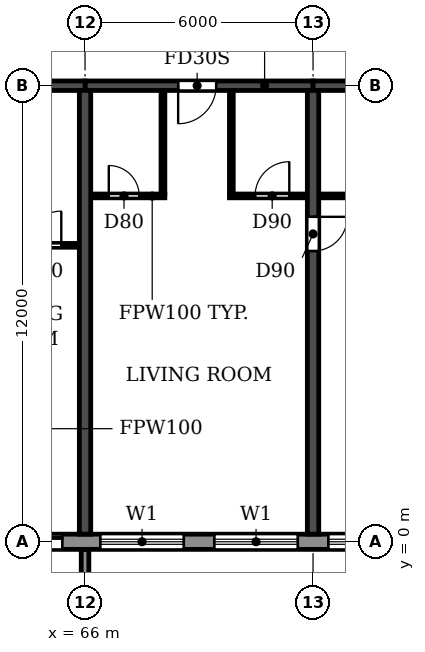
"""IFC4 building model, lengths in metres.
Left out: names, types, materials, properties, quantities, classifications, styles, units other than length and angle.
Written with IfcOpenShell. Run it as: python <this file> out.ifc"""

import sys

from ifc_helpers import new_model, si_unit, direction, frame, frame_2d, origin, place, context, subcontext, project, spatial, polyline, rectangle, outline, extrude, source, transform, mapped, element, fill, save


model = new_model("IFC4")
c1 = context("Model", 3, precision=1e-05, world=origin(), true_north=direction((0.0, 1.0)))
c2 = subcontext(c1, "Body", "Model", "MODEL_VIEW")
j1 = project(units=[si_unit("LENGTHUNIT", "METRE"), si_unit("PLANEANGLEUNIT", "RADIAN")], contexts=[c1])
p1 = place(None, origin())
s1 = spatial("IfcSite", under=j1, at=p1, CompositionType="ELEMENT")
p2 = place(p1, origin())
s2 = spatial("IfcBuilding", under=s1, at=p2, CompositionType="ELEMENT")
p3 = place(p2, frame((0.0, 0.0, 142.2)))
s3 = spatial("IfcBuildingStorey", under=s2, at=p3, CompositionType="ELEMENT", Elevation=142.2)
p4 = place(p3, frame((66.0, 0.2, 0.0), z_axis=(0.0, 0.0, 1.0), x_axis=(0.0, 1.0, 0.0)))
e1 = element("IfcWall", 1, at=p4, inside=s3, PredefinedType="SHEAR", context=c2, shape_type="SweptSolid", body=[
    extrude(rectangle(XDim=11.675, YDim=0.3, at=frame_2d((5.837, 0.0))), origin(), (0.0, 0.0, 1.0), 3.07),
])
p5 = place(p3, frame((72.0, 0.2, 0.0), z_axis=(0.0, 0.0, 1.0), x_axis=(0.0, 1.0, 0.0)))
e2 = element("IfcWall", 2, at=p5, inside=s3, PredefinedType="SHEAR", context=c2, shape_type="SweptSolid", body=[
    extrude(rectangle(XDim=11.675, YDim=0.3, at=frame_2d((5.837, 0.0))), origin(), (0.0, 0.0, 1.0), 3.07),
])
p6 = place(p5, frame((7.45, 0.0, 0.0)))
e3 = element("IfcOpeningElement", 3, at=p6, cuts=e2, PredefinedType="OPENING", context=c2, shape_type="SweptSolid", body=[
    extrude(rectangle(XDim=0.9, YDim=2.1, at=frame_2d((0.45, 1.05))), frame((0.0, 0.16, 0.0), z_axis=(0.0, -1.0, 0.0), x_axis=(1.0, 0.0, 0.0)), (0.0, 0.0, 1.0), 0.32),
])
p7 = place(p3, frame((60.0, 12.0, 0.0), z_axis=(0.0, 0.0, 1.0), x_axis=(1.0, 0.0, 0.0)))
e4 = element("IfcWall", 4, at=p7, inside=s3, PredefinedType="SHEAR", context=c2, shape_type="SweptSolid", body=[
    extrude(rectangle(XDim=6.0, YDim=0.25, at=frame_2d((3.0, 0.0))), origin(), (0.0, 0.0, 1.0), 2.47),
])
p8 = place(p7, frame((2.45, 0.0, 0.0)))
e5 = element("IfcOpeningElement", 5, at=p8, cuts=e4, PredefinedType="OPENING", context=c2, shape_type="SweptSolid", body=[
    extrude(rectangle(XDim=1.0, YDim=2.1, at=frame_2d((0.5, 1.05))), frame((0.0, 0.135, 0.0), z_axis=(0.0, -1.0, 0.0), x_axis=(1.0, 0.0, 0.0)), (0.0, 0.0, 1.0), 0.27),
])
p9 = place(p3, frame((66.0, 12.0, 0.0), z_axis=(0.0, 0.0, 1.0), x_axis=(1.0, 0.0, 0.0)))
e6 = element("IfcWall", 6, at=p9, inside=s3, PredefinedType="SHEAR", context=c2, shape_type="SweptSolid", body=[
    extrude(rectangle(XDim=6.0, YDim=0.25, at=frame_2d((3.0, 0.0))), origin(), (0.0, 0.0, 1.0), 2.47),
])
p10 = place(p9, frame((2.45, 0.0, 0.0)))
e7 = element("IfcOpeningElement", 7, at=p10, cuts=e6, PredefinedType="OPENING", context=c2, shape_type="SweptSolid", body=[
    extrude(rectangle(XDim=1.0, YDim=2.1, at=frame_2d((0.5, 1.05))), frame((0.0, 0.135, 0.0), z_axis=(0.0, -1.0, 0.0), x_axis=(1.0, 0.0, 0.0)), (0.0, 0.0, 1.0), 0.27),
])
p11 = place(p3, frame((72.0, 12.0, 0.0), z_axis=(0.0, 0.0, 1.0), x_axis=(1.0, 0.0, 0.0)))
e8 = element("IfcWall", 8, at=p11, inside=s3, PredefinedType="SHEAR", context=c2, shape_type="SweptSolid", body=[
    extrude(rectangle(XDim=6.0, YDim=0.25, at=frame_2d((3.0, 0.0))), origin(), (0.0, 0.0, 1.0), 2.47),
])
p12 = place(p3, frame((16.683, 0.0, 0.0), z_axis=(0.0, 0.0, 1.0), x_axis=(1.0, 0.0, 0.0)))
e9 = element("IfcWall", 9, at=p12, inside=s3, PredefinedType="STANDARD", context=c2, shape_type="SweptSolid", body=[
    extrude(rectangle(XDim=68.634, YDim=0.4, at=frame_2d((34.317, 0.0))), origin(), (0.0, 0.0, 1.0), 3.07),
])
p13 = place(p12, frame((1.717, 0.0, 0.9)))
e10 = element("IfcOpeningElement", 10, at=p13, cuts=e9, PredefinedType="OPENING", context=c2, shape_type="SweptSolid", body=[
    extrude(rectangle(XDim=2.2, YDim=1.5, at=frame_2d((1.1, 0.75))), frame((0.0, 0.21, 0.0), z_axis=(0.0, -1.0, 0.0), x_axis=(1.0, 0.0, 0.0)), (0.0, 0.0, 1.0), 0.42),
])
p14 = place(p12, frame((4.717, 0.0, 0.9)))
e11 = element("IfcOpeningElement", 11, at=p14, cuts=e9, PredefinedType="OPENING", context=c2, shape_type="SweptSolid", body=[
    extrude(rectangle(XDim=2.2, YDim=1.5, at=frame_2d((1.1, 0.75))), frame((0.0, 0.21, 0.0), z_axis=(0.0, -1.0, 0.0), x_axis=(1.0, 0.0, 0.0)), (0.0, 0.0, 1.0), 0.42),
])
p15 = place(p12, frame((7.717, 0.0, 0.9)))
e12 = element("IfcOpeningElement", 12, at=p15, cuts=e9, PredefinedType="OPENING", context=c2, shape_type="SweptSolid", body=[
    extrude(rectangle(XDim=2.2, YDim=1.5, at=frame_2d((1.1, 0.75))), frame((0.0, 0.21, 0.0), z_axis=(0.0, -1.0, 0.0), x_axis=(1.0, 0.0, 0.0)), (0.0, 0.0, 1.0), 0.42),
])
p16 = place(p12, frame((10.717, 0.0, 0.9)))
e13 = element("IfcOpeningElement", 13, at=p16, cuts=e9, PredefinedType="OPENING", context=c2, shape_type="SweptSolid", body=[
    extrude(rectangle(XDim=2.2, YDim=1.5, at=frame_2d((1.1, 0.75))), frame((0.0, 0.21, 0.0), z_axis=(0.0, -1.0, 0.0), x_axis=(1.0, 0.0, 0.0)), (0.0, 0.0, 1.0), 0.42),
])
p17 = place(p12, frame((13.717, 0.0, 0.9)))
e14 = element("IfcOpeningElement", 14, at=p17, cuts=e9, PredefinedType="OPENING", context=c2, shape_type="SweptSolid", body=[
    extrude(rectangle(XDim=2.2, YDim=1.5, at=frame_2d((1.1, 0.75))), frame((0.0, 0.21, 0.0), z_axis=(0.0, -1.0, 0.0), x_axis=(1.0, 0.0, 0.0)), (0.0, 0.0, 1.0), 0.42),
])
p18 = place(p12, frame((16.717, 0.0, 0.9)))
e15 = element("IfcOpeningElement", 15, at=p18, cuts=e9, PredefinedType="OPENING", context=c2, shape_type="SweptSolid", body=[
    extrude(rectangle(XDim=2.2, YDim=1.5, at=frame_2d((1.1, 0.75))), frame((0.0, 0.21, 0.0), z_axis=(0.0, -1.0, 0.0), x_axis=(1.0, 0.0, 0.0)), (0.0, 0.0, 1.0), 0.42),
])
p19 = place(p12, frame((19.717, 0.0, 0.9)))
e16 = element("IfcOpeningElement", 16, at=p19, cuts=e9, PredefinedType="OPENING", context=c2, shape_type="SweptSolid", body=[
    extrude(rectangle(XDim=2.2, YDim=1.5, at=frame_2d((1.1, 0.75))), frame((0.0, 0.21, 0.0), z_axis=(0.0, -1.0, 0.0), x_axis=(1.0, 0.0, 0.0)), (0.0, 0.0, 1.0), 0.42),
])
p20 = place(p12, frame((22.717, 0.0, 0.9)))
e17 = element("IfcOpeningElement", 17, at=p20, cuts=e9, PredefinedType="OPENING", context=c2, shape_type="SweptSolid", body=[
    extrude(rectangle(XDim=2.2, YDim=1.5, at=frame_2d((1.1, 0.75))), frame((0.0, 0.21, 0.0), z_axis=(0.0, -1.0, 0.0), x_axis=(1.0, 0.0, 0.0)), (0.0, 0.0, 1.0), 0.42),
])
p21 = place(p12, frame((25.717, 0.0, 0.9)))
e18 = element("IfcOpeningElement", 18, at=p21, cuts=e9, PredefinedType="OPENING", context=c2, shape_type="SweptSolid", body=[
    extrude(rectangle(XDim=2.2, YDim=1.5, at=frame_2d((1.1, 0.75))), frame((0.0, 0.21, 0.0), z_axis=(0.0, -1.0, 0.0), x_axis=(1.0, 0.0, 0.0)), (0.0, 0.0, 1.0), 0.42),
])
p22 = place(p12, frame((28.717, 0.0, 0.9)))
e19 = element("IfcOpeningElement", 19, at=p22, cuts=e9, PredefinedType="OPENING", context=c2, shape_type="SweptSolid", body=[
    extrude(rectangle(XDim=2.2, YDim=1.5, at=frame_2d((1.1, 0.75))), frame((0.0, 0.21, 0.0), z_axis=(0.0, -1.0, 0.0), x_axis=(1.0, 0.0, 0.0)), (0.0, 0.0, 1.0), 0.42),
])
p23 = place(p12, frame((31.717, 0.0, 0.9)))
e20 = element("IfcOpeningElement", 20, at=p23, cuts=e9, PredefinedType="OPENING", context=c2, shape_type="SweptSolid", body=[
    extrude(rectangle(XDim=2.2, YDim=1.5, at=frame_2d((1.1, 0.75))), frame((0.0, 0.21, 0.0), z_axis=(0.0, -1.0, 0.0), x_axis=(1.0, 0.0, 0.0)), (0.0, 0.0, 1.0), 0.42),
])
p24 = place(p12, frame((34.917, 0.0, 0.0)))
e21 = element("IfcOpeningElement", 21, at=p24, cuts=e9, PredefinedType="OPENING", context=c2, shape_type="SweptSolid", body=[
    extrude(rectangle(XDim=1.8, YDim=2.4, at=frame_2d((0.9, 1.2))), frame((0.0, 0.21, 0.0), z_axis=(0.0, -1.0, 0.0), x_axis=(1.0, 0.0, 0.0)), (0.0, 0.0, 1.0), 0.42),
])
p25 = place(p12, frame((37.717, 0.0, 0.9)))
e22 = element("IfcOpeningElement", 22, at=p25, cuts=e9, PredefinedType="OPENING", context=c2, shape_type="SweptSolid", body=[
    extrude(rectangle(XDim=2.2, YDim=1.5, at=frame_2d((1.1, 0.75))), frame((0.0, 0.21, 0.0), z_axis=(0.0, -1.0, 0.0), x_axis=(1.0, 0.0, 0.0)), (0.0, 0.0, 1.0), 0.42),
])
p26 = place(p12, frame((40.717, 0.0, 0.9)))
e23 = element("IfcOpeningElement", 23, at=p26, cuts=e9, PredefinedType="OPENING", context=c2, shape_type="SweptSolid", body=[
    extrude(rectangle(XDim=2.2, YDim=1.5, at=frame_2d((1.1, 0.75))), frame((0.0, 0.21, 0.0), z_axis=(0.0, -1.0, 0.0), x_axis=(1.0, 0.0, 0.0)), (0.0, 0.0, 1.0), 0.42),
])
p27 = place(p12, frame((43.717, 0.0, 0.9)))
e24 = element("IfcOpeningElement", 24, at=p27, cuts=e9, PredefinedType="OPENING", context=c2, shape_type="SweptSolid", body=[
    extrude(rectangle(XDim=2.2, YDim=1.5, at=frame_2d((1.1, 0.75))), frame((0.0, 0.21, 0.0), z_axis=(0.0, -1.0, 0.0), x_axis=(1.0, 0.0, 0.0)), (0.0, 0.0, 1.0), 0.42),
])
p28 = place(p12, frame((46.917, 0.0, 0.0)))
e25 = element("IfcOpeningElement", 25, at=p28, cuts=e9, PredefinedType="OPENING", context=c2, shape_type="SweptSolid", body=[
    extrude(rectangle(XDim=1.8, YDim=2.4, at=frame_2d((0.9, 1.2))), frame((0.0, 0.21, 0.0), z_axis=(0.0, -1.0, 0.0), x_axis=(1.0, 0.0, 0.0)), (0.0, 0.0, 1.0), 0.42),
])
p29 = place(p12, frame((49.717, 0.0, 0.9)))
e26 = element("IfcOpeningElement", 26, at=p29, cuts=e9, PredefinedType="OPENING", context=c2, shape_type="SweptSolid", body=[
    extrude(rectangle(XDim=2.2, YDim=1.5, at=frame_2d((1.1, 0.75))), frame((0.0, 0.21, 0.0), z_axis=(0.0, -1.0, 0.0), x_axis=(1.0, 0.0, 0.0)), (0.0, 0.0, 1.0), 0.42),
])
p30 = place(p12, frame((52.717, 0.0, 0.9)))
e27 = element("IfcOpeningElement", 27, at=p30, cuts=e9, PredefinedType="OPENING", context=c2, shape_type="SweptSolid", body=[
    extrude(rectangle(XDim=2.2, YDim=1.5, at=frame_2d((1.1, 0.75))), frame((0.0, 0.21, 0.0), z_axis=(0.0, -1.0, 0.0), x_axis=(1.0, 0.0, 0.0)), (0.0, 0.0, 1.0), 0.42),
])
p31 = place(p12, frame((55.717, 0.0, 0.9)))
e28 = element("IfcOpeningElement", 28, at=p31, cuts=e9, PredefinedType="OPENING", context=c2, shape_type="SweptSolid", body=[
    extrude(rectangle(XDim=2.2, YDim=1.5, at=frame_2d((1.1, 0.75))), frame((0.0, 0.21, 0.0), z_axis=(0.0, -1.0, 0.0), x_axis=(1.0, 0.0, 0.0)), (0.0, 0.0, 1.0), 0.42),
])
p32 = place(p12, frame((58.717, 0.0, 0.9)))
e29 = element("IfcOpeningElement", 29, at=p32, cuts=e9, PredefinedType="OPENING", context=c2, shape_type="SweptSolid", body=[
    extrude(rectangle(XDim=2.2, YDim=1.5, at=frame_2d((1.1, 0.75))), frame((0.0, 0.21, 0.0), z_axis=(0.0, -1.0, 0.0), x_axis=(1.0, 0.0, 0.0)), (0.0, 0.0, 1.0), 0.42),
])
p33 = place(p12, frame((61.717, 0.0, 0.9)))
e30 = element("IfcOpeningElement", 30, at=p33, cuts=e9, PredefinedType="OPENING", context=c2, shape_type="SweptSolid", body=[
    extrude(rectangle(XDim=2.2, YDim=1.5, at=frame_2d((1.1, 0.75))), frame((0.0, 0.21, 0.0), z_axis=(0.0, -1.0, 0.0), x_axis=(1.0, 0.0, 0.0)), (0.0, 0.0, 1.0), 0.42),
])
p34 = place(p12, frame((64.717, 0.0, 0.9)))
e31 = element("IfcOpeningElement", 31, at=p34, cuts=e9, PredefinedType="OPENING", context=c2, shape_type="SweptSolid", body=[
    extrude(rectangle(XDim=2.2, YDim=1.5, at=frame_2d((1.1, 0.75))), frame((0.0, 0.21, 0.0), z_axis=(0.0, -1.0, 0.0), x_axis=(1.0, 0.0, 0.0)), (0.0, 0.0, 1.0), 0.42),
])
m1 = source(origin(), c2, "Body", "SweptSolid", [
    extrude(outline(polyline([(0.0, 0.0), (0.2, 0.0), (0.2, 1.65), (0.0, 1.65), (0.0, 0.0)])), origin(), (0.0, 0.0, 1.0), 3.1),
])
p35 = place(p3, frame((65.9, -1.85, 0.0)))
e32 = element("IfcWall", 32, at=p35, inside=s3, PredefinedType="STANDARD", context=c2, shape_type="MappedRepresentation", body=[
    mapped(m1, transform((0.0, 0.0, 0.0))),
])
p36 = place(p3, frame((63.8, 7.8, 0.0), z_axis=(0.0, 0.0, 1.0), x_axis=(1.0, 0.0, 0.0)))
e33 = element("IfcWall", 33, at=p36, inside=s3, PredefinedType="PARTITIONING", context=c2, shape_type="SweptSolid", body=[
    extrude(rectangle(XDim=2.04, YDim=0.1, at=frame_2d((1.02, 0.0))), origin(), (0.0, 0.0, 1.0), 3.07),
])
p37 = place(p36, frame((0.675, 0.0, 0.0)))
e34 = element("IfcOpeningElement", 34, at=p37, cuts=e33, PredefinedType="OPENING", context=c2, shape_type="SweptSolid", body=[
    extrude(rectangle(XDim=0.9, YDim=2.1, at=frame_2d((0.45, 1.05))), frame((0.0, 0.06, 0.0), z_axis=(0.0, -1.0, 0.0), x_axis=(1.0, 0.0, 0.0)), (0.0, 0.0, 1.0), 0.12),
])
p38 = place(p3, frame((66.16, 9.1, 0.0), z_axis=(0.0, 0.0, 1.0), x_axis=(1.0, 0.0, 0.0)))
e35 = element("IfcWall", 35, at=p38, inside=s3, PredefinedType="PARTITIONING", context=c2, shape_type="SweptSolid", body=[
    extrude(rectangle(XDim=1.94, YDim=0.1, at=frame_2d((0.97, 0.0))), origin(), (0.0, 0.0, 1.0), 3.07),
])
p39 = place(p38, frame((0.465, 0.0, 0.0)))
e36 = element("IfcOpeningElement", 36, at=p39, cuts=e35, PredefinedType="OPENING", context=c2, shape_type="SweptSolid", body=[
    extrude(rectangle(XDim=0.8, YDim=2.1, at=frame_2d((0.4, 1.05))), frame((0.0, 0.06, 0.0), z_axis=(0.0, -1.0, 0.0), x_axis=(1.0, 0.0, 0.0)), (0.0, 0.0, 1.0), 0.12),
])
p40 = place(p3, frame((69.8, 9.1, 0.0), z_axis=(0.0, 0.0, 1.0), x_axis=(1.0, 0.0, 0.0)))
e37 = element("IfcWall", 37, at=p40, inside=s3, PredefinedType="PARTITIONING", context=c2, shape_type="SweptSolid", body=[
    extrude(rectangle(XDim=2.04, YDim=0.1, at=frame_2d((1.02, 0.0))), origin(), (0.0, 0.0, 1.0), 3.07),
])
p41 = place(p40, frame((0.675, 0.0, 0.0)))
e38 = element("IfcOpeningElement", 38, at=p41, cuts=e37, PredefinedType="OPENING", context=c2, shape_type="SweptSolid", body=[
    extrude(rectangle(XDim=0.9, YDim=2.1, at=frame_2d((0.45, 1.05))), frame((0.0, 0.06, 0.0), z_axis=(0.0, -1.0, 0.0), x_axis=(1.0, 0.0, 0.0)), (0.0, 0.0, 1.0), 0.12),
])
p42 = place(p3, frame((72.16, 9.1, 0.0), z_axis=(0.0, 0.0, 1.0), x_axis=(1.0, 0.0, 0.0)))
e39 = element("IfcWall", 39, at=p42, inside=s3, PredefinedType="PARTITIONING", context=c2, shape_type="SweptSolid", body=[
    extrude(rectangle(XDim=2.74, YDim=0.1, at=frame_2d((1.37, 0.0))), origin(), (0.0, 0.0, 1.0), 3.07),
])
p43 = place(p42, frame((0.94, 0.0, 0.0)))
e40 = element("IfcOpeningElement", 40, at=p43, cuts=e39, PredefinedType="OPENING", context=c2, shape_type="SweptSolid", body=[
    extrude(rectangle(XDim=0.8, YDim=2.1, at=frame_2d((0.4, 1.05))), frame((0.0, 0.06, 0.0), z_axis=(0.0, -1.0, 0.0), x_axis=(1.0, 0.0, 0.0)), (0.0, 0.0, 1.0), 0.12),
])
for number, where, z_axis, x_axis in (
    (41, (68.05, 9.15, 0.0), (0.0, 0.0, 1.0), (0.0, 1.0, 0.0)),
    (42, (69.85, 9.15, 0.0), (0.0, 0.0, 1.0), (0.0, 1.0, 0.0)),
):
    element("IfcWall", number, at=place(p3, frame(where, z_axis=z_axis, x_axis=x_axis)), inside=s3, PredefinedType="PARTITIONING", context=c2, shape_type="SweptSolid", body=[
        extrude(rectangle(XDim=2.715, YDim=0.1, at=frame_2d((1.357, 0.0))), origin(), (0.0, 0.0, 1.0), 3.07),
    ])
p44 = place(p28, origin())
e43 = element("IfcDoor", 43, at=p44, inside=s3, OperationType="DOUBLE_DOOR_SLIDING", PredefinedType="DOOR", context=c2, shape_type="SweptSolid", body=[
    extrude(rectangle(XDim=1.8, YDim=2.4, at=frame_2d((0.9, 1.2))), frame((0.0, 0.025, 0.0), z_axis=(0.0, -1.0, 0.0), x_axis=(1.0, 0.0, 0.0)), (0.0, 0.0, 1.0), 0.05),
])
fill(e25, e43)
p45 = place(p29, origin())
e44 = element("IfcWindow", 44, at=p45, inside=s3, PartitioningType="DOUBLE_PANEL_HORIZONTAL", PredefinedType="WINDOW", context=c2, shape_type="SweptSolid", body=[
    extrude(rectangle(XDim=2.2, YDim=1.5, at=frame_2d((1.1, 0.75))), frame((0.0, 0.03, 0.0), z_axis=(0.0, -1.0, 0.0), x_axis=(1.0, 0.0, 0.0)), (0.0, 0.0, 1.0), 0.06),
])
fill(e26, e44)
p46 = place(p30, origin())
e45 = element("IfcWindow", 45, at=p46, inside=s3, PartitioningType="DOUBLE_PANEL_HORIZONTAL", PredefinedType="WINDOW", context=c2, shape_type="SweptSolid", body=[
    extrude(rectangle(XDim=2.2, YDim=1.5, at=frame_2d((1.1, 0.75))), frame((0.0, 0.03, 0.0), z_axis=(0.0, -1.0, 0.0), x_axis=(1.0, 0.0, 0.0)), (0.0, 0.0, 1.0), 0.06),
])
fill(e27, e45)
p47 = place(p31, origin())
e46 = element("IfcWindow", 46, at=p47, inside=s3, PartitioningType="DOUBLE_PANEL_HORIZONTAL", PredefinedType="WINDOW", context=c2, shape_type="SweptSolid", body=[
    extrude(rectangle(XDim=2.2, YDim=1.5, at=frame_2d((1.1, 0.75))), frame((0.0, 0.03, 0.0), z_axis=(0.0, -1.0, 0.0), x_axis=(1.0, 0.0, 0.0)), (0.0, 0.0, 1.0), 0.06),
])
fill(e28, e46)
p48 = place(p37, origin())
e47 = element("IfcDoor", 47, at=p48, inside=s3, OperationType="SINGLE_SWING_RIGHT", PredefinedType="DOOR", context=c2, shape_type="SweptSolid", body=[
    extrude(rectangle(XDim=0.9, YDim=2.1, at=frame_2d((0.45, 1.05))), frame((0.0, 0.025, 0.0), z_axis=(0.0, -1.0, 0.0), x_axis=(1.0, 0.0, 0.0)), (0.0, 0.0, 1.0), 0.05),
])
fill(e34, e47)
p49 = place(p39, origin())
e48 = element("IfcDoor", 48, at=p49, inside=s3, OperationType="SINGLE_SWING_LEFT", PredefinedType="DOOR", context=c2, shape_type="SweptSolid", body=[
    extrude(rectangle(XDim=0.8, YDim=2.1, at=frame_2d((0.4, 1.05))), frame((0.0, 0.025, 0.0), z_axis=(0.0, -1.0, 0.0), x_axis=(1.0, 0.0, 0.0)), (0.0, 0.0, 1.0), 0.05),
])
fill(e36, e48)
p50 = place(p10, frame((1.0, 0.0, 0.0), z_axis=(0.0, 0.0, 1.0), x_axis=(-1.0, 0.0, 0.0)))
e49 = element("IfcDoor", 49, at=p50, inside=s3, OperationType="SINGLE_SWING_RIGHT", PredefinedType="DOOR", context=c2, shape_type="SweptSolid", body=[
    extrude(rectangle(XDim=1.0, YDim=2.1, at=frame_2d((0.5, 1.05))), frame((0.0, 0.025, 0.0), z_axis=(0.0, -1.0, 0.0), x_axis=(1.0, 0.0, 0.0)), (0.0, 0.0, 1.0), 0.05),
])
fill(e7, e49)
p51 = place(p41, origin())
e50 = element("IfcDoor", 50, at=p51, inside=s3, OperationType="SINGLE_SWING_RIGHT", PredefinedType="DOOR", context=c2, shape_type="SweptSolid", body=[
    extrude(rectangle(XDim=0.9, YDim=2.1, at=frame_2d((0.45, 1.05))), frame((0.0, 0.025, 0.0), z_axis=(0.0, -1.0, 0.0), x_axis=(1.0, 0.0, 0.0)), (0.0, 0.0, 1.0), 0.05),
])
fill(e38, e50)
p52 = place(p6, frame((0.9, 0.0, 0.0), z_axis=(0.0, 0.0, 1.0), x_axis=(-1.0, 0.0, 0.0)))
e51 = element("IfcDoor", 51, at=p52, inside=s3, OperationType="SINGLE_SWING_LEFT", PredefinedType="DOOR", context=c2, shape_type="SweptSolid", body=[
    extrude(rectangle(XDim=0.9, YDim=2.1, at=frame_2d((0.45, 1.05))), frame((0.0, 0.025, 0.0), z_axis=(0.0, -1.0, 0.0), x_axis=(1.0, 0.0, 0.0)), (0.0, 0.0, 1.0), 0.05),
])
fill(e3, e51)
save(model, sys.argv[1])
